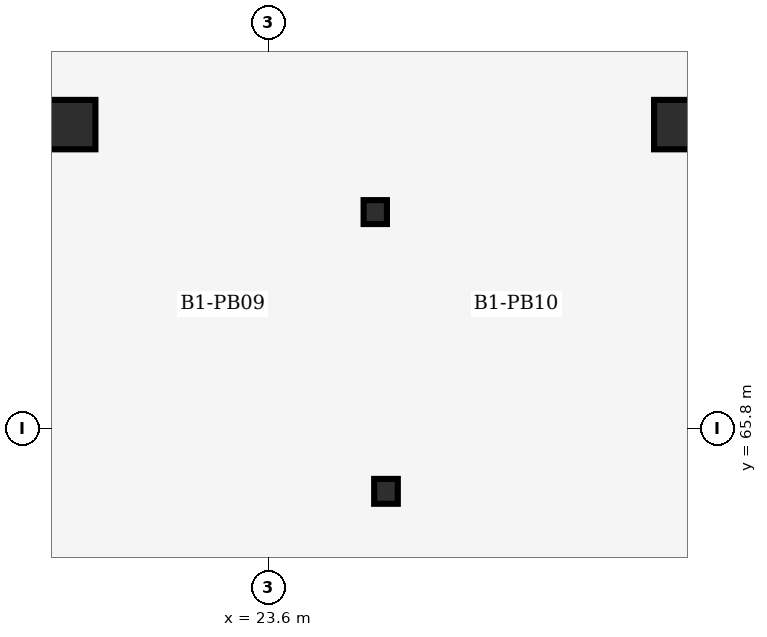
"""IFC4 building model, lengths in metres.
Left out: names, types, materials, properties, quantities, classifications, styles, units other than length and angle.
Written with IfcOpenShell. Run it as: python <this file> out.ifc"""

import sys

from ifc_helpers import new_model, si_unit, direction, frame, origin, origin_2d, place, context, subcontext, project, spatial, rectangle, i_section, extrude, element, save


model = new_model("IFC4")
c1 = context("Model", 3, precision=1e-05, world=origin(), true_north=direction((0.0, 1.0)))
c2 = subcontext(c1, "Body", "Model", "MODEL_VIEW")
j1 = project(units=[si_unit("LENGTHUNIT", "METRE"), si_unit("PLANEANGLEUNIT", "RADIAN")], contexts=[c1])
p1 = place(None, origin())
s1 = spatial("IfcSite", under=j1, at=p1, CompositionType="ELEMENT")
p2 = place(p1, origin())
s2 = spatial("IfcBuilding", under=s1, at=p2, CompositionType="ELEMENT")
p3 = place(p2, frame((0.0, 0.0, -4.8)))
s3 = spatial("IfcBuildingStorey", under=s2, at=p3, CompositionType="ELEMENT", Elevation=-4.8)
p4 = place(p3, frame((25.007, 68.649, 0.0), z_axis=(0.0, 0.0, 1.0), x_axis=(1.0, 0.0, 0.0)))
e1 = element("IfcColumn", 1, at=p4, inside=s3, PredefinedType="COLUMN", context=c2, shape_type="SweptSolid", body=[
    extrude(i_section(OverallWidth=0.307, OverallDepth=0.315, WebThickness=0.012, FlangeThickness=0.019, at=origin_2d()), origin(), (0.0, 0.0, 1.0), 4.8),
])
p5 = place(p3, frame((25.148, 64.975, 0.0), z_axis=(0.0, 0.0, 1.0), x_axis=(1.0, 0.0, 0.0)))
e2 = element("IfcColumn", 2, at=p5, inside=s3, PredefinedType="COLUMN", context=c2, shape_type="SweptSolid", body=[
    extrude(i_section(OverallWidth=0.311, OverallDepth=0.327, WebThickness=0.016, FlangeThickness=0.025, at=origin_2d()), origin(), (0.0, 0.0, 1.0), 4.8),
])
for number, where, z_axis, x_axis in (
    (3, (21.0, 69.8, 0.0), (0.0, 0.0, 1.0), (1.0, 0.0, 0.0)),
    (4, (29.0, 69.8, 0.0), (0.0, 0.0, 1.0), (1.0, 0.0, 0.0)),
):
    element("IfcColumn", number, at=place(p3, frame(where, z_axis=z_axis, x_axis=x_axis)), inside=s3, PredefinedType="COLUMN", context=c2, shape_type="SweptSolid", body=[
        extrude(rectangle(XDim=0.65, YDim=0.65, at=origin_2d()), origin(), (0.0, 0.0, 1.0), 4.8),
    ])
save(model, sys.argv[1])
